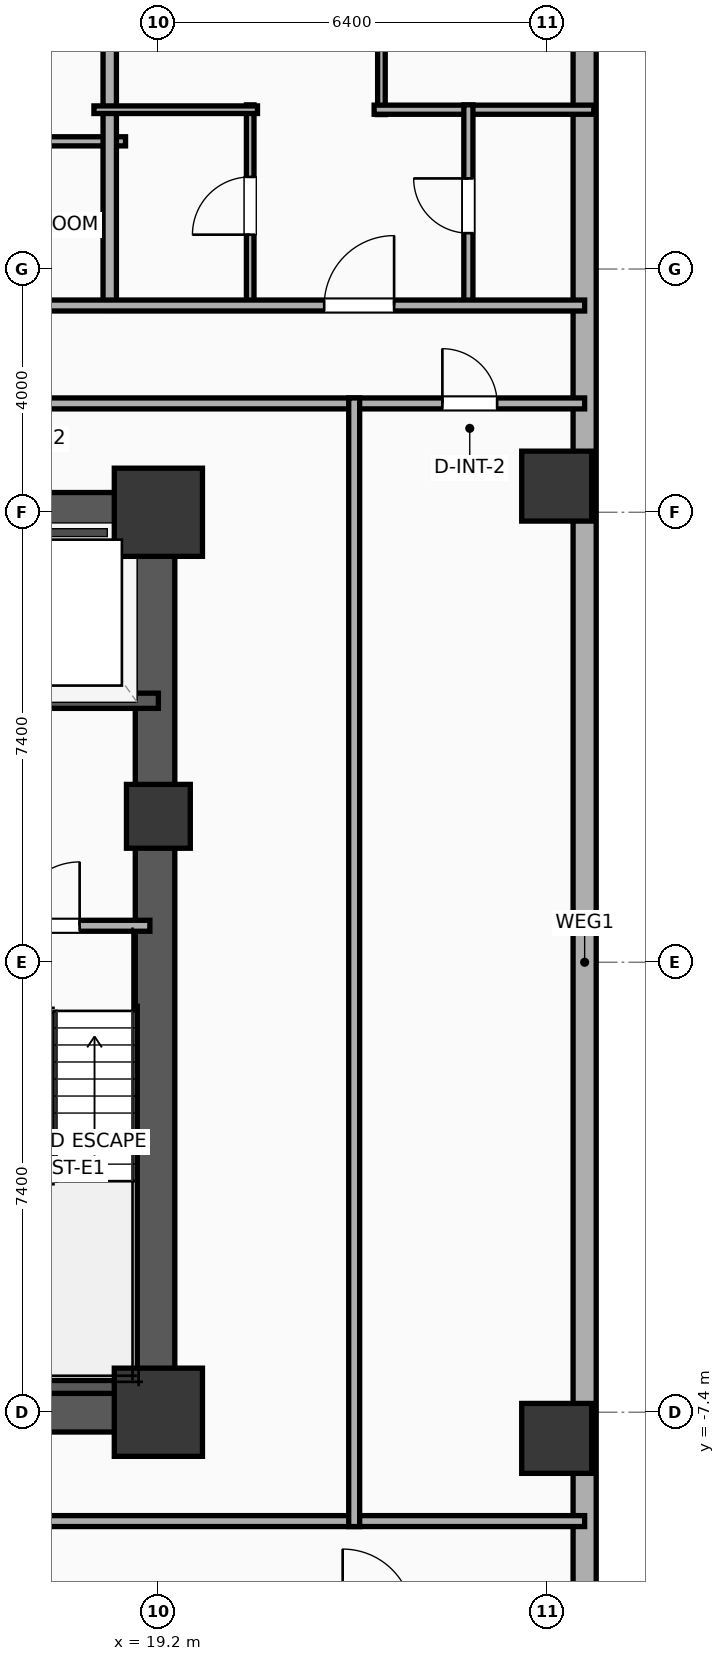
"""IFC4 building model, lengths in metres.
Left out: names, types, materials, properties, quantities, classifications, styles, units other than length and angle.
Written with IfcOpenShell. Run it as: python <this file> out.ifc"""

import sys

from ifc_helpers import new_model, si_unit, direction, frame, frame_2d, origin, origin_2d, place, context, subcontext, project, spatial, rectangle, hollow_rectangle, extrude, element, fill, save


model = new_model("IFC4")
c1 = context("Model", 3, precision=1e-05, world=origin(), true_north=direction((0.0, 1.0)))
c2 = subcontext(c1, "Body", "Model", "MODEL_VIEW")
j1 = project(units=[si_unit("LENGTHUNIT", "METRE"), si_unit("PLANEANGLEUNIT", "RADIAN")], contexts=[c1])
p1 = place(None, origin())
s1 = spatial("IfcSite", under=j1, at=p1, CompositionType="ELEMENT")
p2 = place(p1, origin())
s2 = spatial("IfcBuilding", under=s1, at=p2, CompositionType="ELEMENT")
p3 = place(p2, frame((0.0, 0.0, 29.9)))
s3 = spatial("IfcBuildingStorey", under=s2, at=p3, CompositionType="ELEMENT", Elevation=29.9)
p4 = place(p3, frame((19.2, -7.4, 0.0), z_axis=(0.0, 0.0, 1.0), x_axis=(1.0, 0.0, 0.0)))
e1 = element("IfcColumn", 1, at=p4, inside=s3, PredefinedType="COLUMN", context=c2, shape_type="SweptSolid", body=[
    extrude(rectangle(XDim=1.45, YDim=1.45, at=origin_2d()), origin(), (0.0, 0.0, 1.0), 3.9),
])
p5 = place(p3, frame((19.2, 2.4, 0.0), z_axis=(0.0, 0.0, 1.0), x_axis=(1.0, 0.0, 0.0)))
e2 = element("IfcColumn", 2, at=p5, inside=s3, PredefinedType="COLUMN", context=c2, shape_type="SweptSolid", body=[
    extrude(rectangle(XDim=1.05, YDim=1.05, at=origin_2d()), origin(), (0.0, 0.0, 1.0), 3.9),
])
p6 = place(p3, frame((19.2, 7.4, 0.0), z_axis=(0.0, 0.0, 1.0), x_axis=(1.0, 0.0, 0.0)))
e3 = element("IfcColumn", 3, at=p6, inside=s3, PredefinedType="COLUMN", context=c2, shape_type="SweptSolid", body=[
    extrude(rectangle(XDim=1.45, YDim=1.45, at=origin_2d()), origin(), (0.0, 0.0, 1.0), 3.9),
])
for number, where, z_axis, x_axis in (
    (4, (12.075, -7.4, 0.0), (0.0, 0.0, 1.0), (1.0, 0.0, 0.0)),
    (5, (12.075, 7.4, 0.0), (0.0, 0.0, 1.0), (1.0, 0.0, 0.0)),
):
    element("IfcWall", number, at=place(p3, frame(where, z_axis=z_axis, x_axis=x_axis)), inside=s3, PredefinedType="SHEAR", context=c2, shape_type="SweptSolid", body=[
        extrude(rectangle(XDim=7.45, YDim=0.65, at=frame_2d((3.725, 0.0))), origin(), (0.0, 0.0, 1.0), 3.65),
    ])
p7 = place(p3, frame((19.145, -7.4, 0.0), z_axis=(0.0, 0.0, 1.0), x_axis=(0.0, 1.0, 0.0)))
e6 = element("IfcWall", 6, at=p7, inside=s3, PredefinedType="SHEAR", context=c2, shape_type="SweptSolid", body=[
    extrude(rectangle(XDim=14.8, YDim=0.65, at=frame_2d((7.4, 0.0))), origin(), (0.0, 0.0, 1.0), 3.65),
])
p8 = place(p3, frame((15.74, -6.965, 0.0), z_axis=(0.0, 0.0, 1.0), x_axis=(1.0, 0.0, 0.0)))
e7 = element("IfcWall", 7, at=p8, inside=s3, PredefinedType="SOLIDWALL", context=c2, shape_type="SweptSolid", body=[
    extrude(rectangle(XDim=3.46, YDim=0.25, at=frame_2d((1.73, 0.0))), origin(), (0.0, 0.0, 1.0), 3.65),
])
for number, where, z_axis, x_axis in (
    (8, (25.75, -7.83, 0.0), (0.0, 0.0, 1.0), (1.0, 0.0, 0.0)),
    (9, (25.75, 7.83, 0.0), (0.0, 0.0, 1.0), (1.0, 0.0, 0.0)),
):
    element("IfcColumn", number, at=place(p3, frame(where, z_axis=z_axis, x_axis=x_axis)), inside=s3, PredefinedType="COLUMN", context=c2, shape_type="SweptSolid", body=[
        extrude(hollow_rectangle(XDim=1.15, YDim=1.15, WallThickness=0.04, at=origin_2d()), origin(), (0.0, 0.0, 1.0), 3.9),
    ])
p9 = place(p3, frame((26.21, 18.381, 0.0), z_axis=(0.0, 0.0, 1.0), x_axis=(0.0, -1.0, 0.0)))
e10 = element("IfcWall", 10, at=p9, inside=s3, PredefinedType="ELEMENTEDWALL", context=c2, shape_type="SweptSolid", body=[
    extrude(rectangle(XDim=36.763, YDim=0.38, at=frame_2d((18.381, 0.0))), origin(), (0.0, 0.0, 1.0), 2.54),
])
p10 = place(p9, frame((33.537, 0.0, 0.75)))
e11 = element("IfcOpeningElement", 11, at=p10, cuts=e10, PredefinedType="OPENING", context=c2, shape_type="SweptSolid", body=[
    extrude(rectangle(XDim=1.2, YDim=1.63, at=frame_2d((0.6, 0.815))), frame((0.0, 0.2, 0.0), z_axis=(0.0, -1.0, 0.0), x_axis=(1.0, 0.0, 0.0)), (0.0, 0.0, 1.0), 0.4),
])
p11 = place(p3, frame((16.6, 4.3, 0.0), z_axis=(0.0, 0.0, 1.0), x_axis=(1.0, 0.0, 0.0)))
e12 = element("IfcWall", 12, at=p11, inside=s3, PredefinedType="SOLIDWALL", context=c2, shape_type="SweptSolid", body=[
    extrude(rectangle(XDim=2.6, YDim=0.25, at=frame_2d((1.3, 0.0))), origin(), (0.0, 0.0, 1.0), 3.65),
])
p12 = place(p3, frame((15.7, 0.6, 0.0), z_axis=(0.0, 0.0, 1.0), x_axis=(1.0, 0.0, 0.0)))
e13 = element("IfcWall", 13, at=p12, inside=s3, PredefinedType="PARTITIONING", context=c2, shape_type="SweptSolid", body=[
    extrude(rectangle(XDim=3.36, YDim=0.18, at=frame_2d((1.68, 0.0))), origin(), (0.0, 0.0, 1.0), 3.65),
])
p13 = place(p12, frame((1.155, 0.0, 0.0)))
e14 = element("IfcOpeningElement", 14, at=p13, cuts=e13, PredefinedType="OPENING", context=c2, shape_type="SweptSolid", body=[
    extrude(rectangle(XDim=1.05, YDim=2.05, at=frame_2d((0.525, 1.025))), frame((0.0, 0.1, 0.0), z_axis=(0.0, -1.0, 0.0), x_axis=(1.0, 0.0, 0.0)), (0.0, 0.0, 1.0), 0.2),
])
p14 = place(p3, frame((9.88, 9.19, 0.0), z_axis=(0.0, 0.0, 1.0), x_axis=(1.0, 0.0, 0.0)))
e15 = element("IfcWall", 15, at=p14, inside=s3, PredefinedType="PARTITIONING", context=c2, shape_type="SweptSolid", body=[
    extrude(rectangle(XDim=16.33, YDim=0.18, at=frame_2d((8.165, 0.0))), origin(), (0.0, 0.0, 1.0), 3.65),
])
p15 = place(p14, frame((13.99, 0.0, 0.0)))
e16 = element("IfcOpeningElement", 16, at=p15, cuts=e15, PredefinedType="OPENING", context=c2, shape_type="SweptSolid", body=[
    extrude(rectangle(XDim=0.9, YDim=2.05, at=frame_2d((0.45, 1.025))), frame((0.0, 0.1, 0.0), z_axis=(0.0, -1.0, 0.0), x_axis=(1.0, 0.0, 0.0)), (0.0, 0.0, 1.0), 0.2),
])
p16 = place(p3, frame((9.88, -9.19, 0.0), z_axis=(0.0, 0.0, 1.0), x_axis=(1.0, 0.0, 0.0)))
e17 = element("IfcWall", 17, at=p16, inside=s3, PredefinedType="PARTITIONING", context=c2, shape_type="SweptSolid", body=[
    extrude(rectangle(XDim=16.33, YDim=0.18, at=frame_2d((8.165, 0.0))), origin(), (0.0, 0.0, 1.0), 3.65),
])
p17 = place(p3, frame((16.11, 13.5, 0.0), z_axis=(0.0, 0.0, 1.0), x_axis=(1.0, 0.0, 0.0)))
e18 = element("IfcWall", 18, at=p17, inside=s3, PredefinedType="PLUMBINGWALL", context=c2, shape_type="SweptSolid", body=[
    extrude(rectangle(XDim=2.55, YDim=0.15, at=frame_2d((1.275, 0.0))), origin(), (0.0, 0.0, 1.0), 3.65),
])
p18 = place(p3, frame((18.4, 10.72, 0.0), z_axis=(0.0, 0.0, 1.0), x_axis=(0.0, 1.0, 0.0)))
e19 = element("IfcWall", 19, at=p18, inside=s3, PredefinedType="PARTITIONING", context=c2, shape_type="SweptSolid", body=[
    extrude(rectangle(XDim=11.49, YDim=0.22, at=frame_2d((5.745, 0.0))), origin(), (0.0, 0.0, 1.0), 3.65),
])
p19 = place(p3, frame((22.868, 13.94, 0.0), z_axis=(0.0, 0.0, 1.0), x_axis=(0.0, 1.0, 0.0)))
e20 = element("IfcWall", 20, at=p19, inside=s3, PredefinedType="PARTITIONING", context=c2, shape_type="SweptSolid", body=[
    extrude(rectangle(XDim=8.326, YDim=0.125, at=frame_2d((4.163, 0.0))), origin(), (0.0, 0.0, 1.0), 2.54),
])
p20 = place(p19, frame((1.548, 0.0, 0.0)))
e21 = element("IfcOpeningElement", 21, at=p20, cuts=e20, PredefinedType="OPENING", context=c2, shape_type="SweptSolid", body=[
    extrude(rectangle(XDim=0.9, YDim=2.05, at=frame_2d((0.45, 1.025))), frame((0.0, 0.073, 0.0), z_axis=(0.0, -1.0, 0.0), x_axis=(1.0, 0.0, 0.0)), (0.0, 0.0, 1.0), 0.145),
])
p21 = place(p3, frame((22.748, 14.02, 0.0), z_axis=(0.0, 0.0, 1.0), x_axis=(1.0, 0.0, 0.0)))
e22 = element("IfcWall", 22, at=p21, inside=s3, PredefinedType="PLUMBINGWALL", context=c2, shape_type="SweptSolid", body=[
    extrude(rectangle(XDim=3.612, YDim=0.15, at=frame_2d((1.806, 0.0))), origin(), (0.0, 0.0, 1.0), 3.65),
])
p22 = place(p3, frame((20.71, 10.78, 0.0), z_axis=(0.0, 0.0, 1.0), x_axis=(0.0, 1.0, 0.0)))
e23 = element("IfcWall", 23, at=p22, inside=s3, PredefinedType="PARTITIONING", context=c2, shape_type="SweptSolid", body=[
    extrude(rectangle(XDim=3.32, YDim=0.125, at=frame_2d((1.66, 0.0))), origin(), (0.0, 0.0, 1.0), 2.54),
])
p23 = place(p22, frame((1.185, 0.0, 0.0)))
e24 = element("IfcOpeningElement", 24, at=p23, cuts=e23, PredefinedType="OPENING", context=c2, shape_type="SweptSolid", body=[
    extrude(rectangle(XDim=0.95, YDim=2.05, at=frame_2d((0.475, 1.025))), frame((0.0, 0.073, 0.0), z_axis=(0.0, -1.0, 0.0), x_axis=(1.0, 0.0, 0.0)), (0.0, 0.0, 1.0), 0.145),
])
p24 = place(p3, frame((18.14, 14.02, 0.0), z_axis=(0.0, 0.0, 1.0), x_axis=(1.0, 0.0, 0.0)))
e25 = element("IfcWall", 25, at=p24, inside=s3, PredefinedType="PARTITIONING", context=c2, shape_type="SweptSolid", body=[
    extrude(rectangle(XDim=2.69, YDim=0.125, at=frame_2d((1.345, 0.0))), origin(), (0.0, 0.0, 1.0), 3.65),
])
p25 = place(p3, frame((24.298, 10.78, 0.0), z_axis=(0.0, 0.0, 1.0), x_axis=(0.0, 1.0, 0.0)))
e26 = element("IfcWall", 26, at=p25, inside=s3, PredefinedType="PLUMBINGWALL", context=c2, shape_type="SweptSolid", body=[
    extrude(rectangle(XDim=3.32, YDim=0.15, at=frame_2d((1.66, 0.0))), origin(), (0.0, 0.0, 1.0), 3.65),
])
p26 = place(p25, frame((1.21, 0.0, 0.0)))
e27 = element("IfcOpeningElement", 27, at=p26, cuts=e26, PredefinedType="OPENING", context=c2, shape_type="SweptSolid", body=[
    extrude(rectangle(XDim=0.9, YDim=2.05, at=frame_2d((0.45, 1.025))), frame((0.0, 0.085, 0.0), z_axis=(0.0, -1.0, 0.0), x_axis=(1.0, 0.0, 0.0)), (0.0, 0.0, 1.0), 0.17),
])
p27 = place(p3, frame((-33.41, 10.8, 0.0), z_axis=(0.0, 0.0, 1.0), x_axis=(1.0, 0.0, 0.0)))
e28 = element("IfcWall", 28, at=p27, inside=s3, PredefinedType="PARTITIONING", context=c2, shape_type="SweptSolid", body=[
    extrude(rectangle(XDim=59.62, YDim=0.18, at=frame_2d((29.81, 0.0))), origin(), (0.0, 0.0, 1.0), 3.65),
])
p28 = place(p27, frame((3.062, 0.0, 0.0)))
e29 = element("IfcOpeningElement", 29, at=p28, cuts=e28, PredefinedType="OPENING", context=c2, shape_type="SweptSolid", body=[
    extrude(rectangle(XDim=1.15, YDim=2.05, at=frame_2d((0.575, 1.025))), frame((0.0, 0.1, 0.0), z_axis=(0.0, -1.0, 0.0), x_axis=(1.0, 0.0, 0.0)), (0.0, 0.0, 1.0), 0.2),
])
p29 = place(p27, frame((10.312, 0.0, 0.0)))
e30 = element("IfcOpeningElement", 30, at=p29, cuts=e28, PredefinedType="OPENING", context=c2, shape_type="SweptSolid", body=[
    extrude(rectangle(XDim=1.15, YDim=2.05, at=frame_2d((0.575, 1.025))), frame((0.0, 0.1, 0.0), z_axis=(0.0, -1.0, 0.0), x_axis=(1.0, 0.0, 0.0)), (0.0, 0.0, 1.0), 0.2),
])
p30 = place(p27, frame((15.153, 0.0, 0.0)))
e31 = element("IfcOpeningElement", 31, at=p30, cuts=e28, PredefinedType="OPENING", context=c2, shape_type="SweptSolid", body=[
    extrude(rectangle(XDim=0.9, YDim=2.05, at=frame_2d((0.45, 1.025))), frame((0.0, 0.1, 0.0), z_axis=(0.0, -1.0, 0.0), x_axis=(1.0, 0.0, 0.0)), (0.0, 0.0, 1.0), 0.2),
])
p31 = place(p27, frame((21.508, 0.0, 0.0)))
e32 = element("IfcOpeningElement", 32, at=p31, cuts=e28, PredefinedType="OPENING", context=c2, shape_type="SweptSolid", body=[
    extrude(rectangle(XDim=1.15, YDim=2.05, at=frame_2d((0.575, 1.025))), frame((0.0, 0.1, 0.0), z_axis=(0.0, -1.0, 0.0), x_axis=(1.0, 0.0, 0.0)), (0.0, 0.0, 1.0), 0.2),
])
p32 = place(p27, frame((26.355, 0.0, 0.0)))
e33 = element("IfcOpeningElement", 33, at=p32, cuts=e28, PredefinedType="OPENING", context=c2, shape_type="SweptSolid", body=[
    extrude(rectangle(XDim=0.9, YDim=2.05, at=frame_2d((0.45, 1.025))), frame((0.0, 0.1, 0.0), z_axis=(0.0, -1.0, 0.0), x_axis=(1.0, 0.0, 0.0)), (0.0, 0.0, 1.0), 0.2),
])
p33 = place(p27, frame((32.753, 0.0, 0.0)))
e34 = element("IfcOpeningElement", 34, at=p33, cuts=e28, PredefinedType="OPENING", context=c2, shape_type="SweptSolid", body=[
    extrude(rectangle(XDim=1.15, YDim=2.05, at=frame_2d((0.575, 1.025))), frame((0.0, 0.1, 0.0), z_axis=(0.0, -1.0, 0.0), x_axis=(1.0, 0.0, 0.0)), (0.0, 0.0, 1.0), 0.2),
])
p34 = place(p27, frame((36.163, 0.0, 0.0)))
e35 = element("IfcOpeningElement", 35, at=p34, cuts=e28, PredefinedType="OPENING", context=c2, shape_type="SweptSolid", body=[
    extrude(rectangle(XDim=1.15, YDim=2.05, at=frame_2d((0.575, 1.025))), frame((0.0, 0.1, 0.0), z_axis=(0.0, -1.0, 0.0), x_axis=(1.0, 0.0, 0.0)), (0.0, 0.0, 1.0), 0.2),
])
p35 = place(p27, frame((43.156, 0.0, 0.0)))
e36 = element("IfcOpeningElement", 36, at=p35, cuts=e28, PredefinedType="OPENING", context=c2, shape_type="SweptSolid", body=[
    extrude(rectangle(XDim=0.9, YDim=2.05, at=frame_2d((0.45, 1.025))), frame((0.0, 0.1, 0.0), z_axis=(0.0, -1.0, 0.0), x_axis=(1.0, 0.0, 0.0)), (0.0, 0.0, 1.0), 0.2),
])
p36 = place(p27, frame((47.36, 0.0, 0.0)))
e37 = element("IfcOpeningElement", 37, at=p36, cuts=e28, PredefinedType="OPENING", context=c2, shape_type="SweptSolid", body=[
    extrude(rectangle(XDim=1.15, YDim=2.05, at=frame_2d((0.575, 1.025))), frame((0.0, 0.1, 0.0), z_axis=(0.0, -1.0, 0.0), x_axis=(1.0, 0.0, 0.0)), (0.0, 0.0, 1.0), 0.2),
])
p37 = place(p27, frame((55.337, 0.0, 0.0)))
e38 = element("IfcOpeningElement", 38, at=p37, cuts=e28, PredefinedType="OPENING", context=c2, shape_type="SweptSolid", body=[
    extrude(rectangle(XDim=1.15, YDim=2.05, at=frame_2d((0.575, 1.025))), frame((0.0, 0.1, 0.0), z_axis=(0.0, -1.0, 0.0), x_axis=(1.0, 0.0, 0.0)), (0.0, 0.0, 1.0), 0.2),
])
p38 = place(p3, frame((22.42, -9.28, 0.0), z_axis=(0.0, 0.0, 1.0), x_axis=(0.0, 1.0, 0.0)))
e39 = element("IfcWall", 39, at=p38, inside=s3, PredefinedType="PARTITIONING", context=c2, shape_type="SweptSolid", body=[
    extrude(rectangle(XDim=18.56, YDim=0.18, at=frame_2d((9.28, 0.0))), origin(), (0.0, 0.0, 1.0), 3.65),
])
p39 = place(p13, origin())
e40 = element("IfcDoor", 40, at=p39, inside=s3, OperationType="SINGLE_SWING_RIGHT", PredefinedType="DOOR", context=c2, shape_type="SweptSolid", body=[
    extrude(rectangle(XDim=1.05, YDim=2.05, at=frame_2d((0.525, 1.025))), frame((0.0, 0.025, 0.0), z_axis=(0.0, -1.0, 0.0), x_axis=(1.0, 0.0, 0.0)), (0.0, 0.0, 1.0), 0.05),
])
fill(e14, e40)
p40 = place(p15, origin())
e41 = element("IfcDoor", 41, at=p40, inside=s3, OperationType="SINGLE_SWING_LEFT", PredefinedType="DOOR", context=c2, shape_type="SweptSolid", body=[
    extrude(rectangle(XDim=0.9, YDim=2.05, at=frame_2d((0.45, 1.025))), frame((0.0, 0.025, 0.0), z_axis=(0.0, -1.0, 0.0), x_axis=(1.0, 0.0, 0.0)), (0.0, 0.0, 1.0), 0.05),
])
fill(e16, e41)
p41 = place(p23, origin())
e42 = element("IfcDoor", 42, at=p41, inside=s3, OperationType="SINGLE_SWING_LEFT", PredefinedType="DOOR", context=c2, shape_type="SweptSolid", body=[
    extrude(rectangle(XDim=0.95, YDim=2.05, at=frame_2d((0.475, 1.025))), frame((0.0, 0.025, 0.0), z_axis=(0.0, -1.0, 0.0), x_axis=(1.0, 0.0, 0.0)), (0.0, 0.0, 1.0), 0.05),
])
fill(e24, e42)
p42 = place(p26, origin())
e43 = element("IfcDoor", 43, at=p42, inside=s3, OperationType="SINGLE_SWING_RIGHT", PredefinedType="DOOR", context=c2, shape_type="SweptSolid", body=[
    extrude(rectangle(XDim=0.9, YDim=2.05, at=frame_2d((0.45, 1.025))), frame((0.0, 0.025, 0.0), z_axis=(0.0, -1.0, 0.0), x_axis=(1.0, 0.0, 0.0)), (0.0, 0.0, 1.0), 0.05),
])
fill(e27, e43)
p43 = place(p37, origin())
e44 = element("IfcDoor", 44, at=p43, inside=s3, OperationType="SINGLE_SWING_RIGHT", PredefinedType="DOOR", context=c2, shape_type="SweptSolid", body=[
    extrude(rectangle(XDim=1.15, YDim=2.05, at=frame_2d((0.575, 1.025))), frame((0.0, 0.025, 0.0), z_axis=(0.0, -1.0, 0.0), x_axis=(1.0, 0.0, 0.0)), (0.0, 0.0, 1.0), 0.05),
])
fill(e38, e44)
save(model, sys.argv[1])
